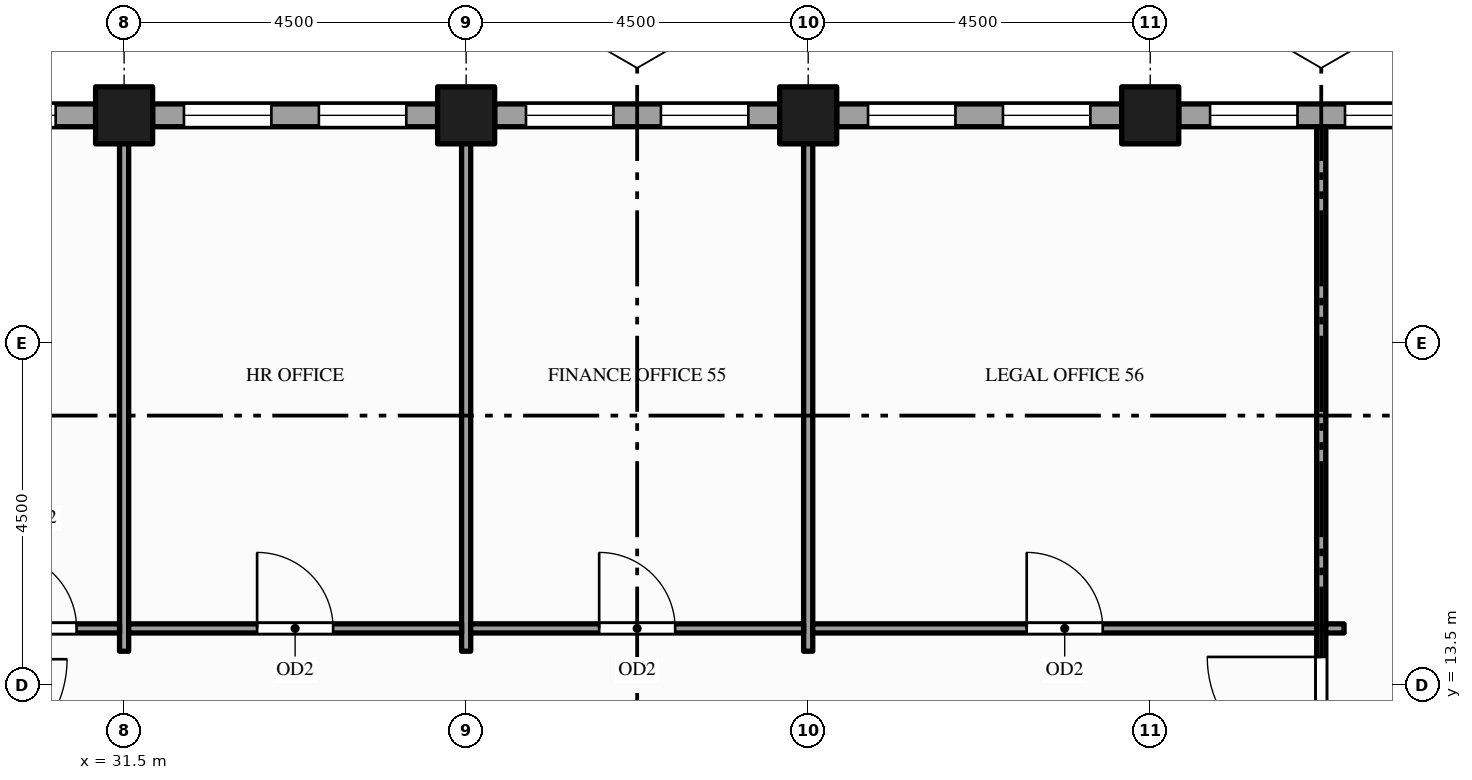
"""IFC4 building model, lengths in metres.
Left out: names, types, materials, properties, quantities, classifications, styles, units other than length and angle.
Written with IfcOpenShell. Run it as: python <this file> out.ifc"""

import sys

from ifc_helpers import new_model, si_unit, direction, frame, frame_2d, origin, origin_2d, place, context, subcontext, project, spatial, rectangle, hollow_rectangle, extrude, element, fill, save


model = new_model("IFC4")
c1 = context("Model", 3, precision=1e-05, world=origin(), true_north=direction((0.0, 1.0)))
c2 = subcontext(c1, "Body", "Model", "MODEL_VIEW")
j1 = project(units=[si_unit("LENGTHUNIT", "METRE"), si_unit("PLANEANGLEUNIT", "RADIAN")], contexts=[c1])
p1 = place(None, origin())
s1 = spatial("IfcSite", under=j1, at=p1, CompositionType="ELEMENT")
p2 = place(p1, origin())
s2 = spatial("IfcBuilding", under=s1, at=p2, CompositionType="ELEMENT")
p3 = place(p2, frame((0.0, 0.0, 207.0)))
s3 = spatial("IfcBuildingStorey", under=s2, at=p3, CompositionType="ELEMENT", Elevation=207.0)
for number, where, z_axis, x_axis in (
    (1, (31.5, 21.0, -0.15), (0.0, 0.0, 1.0), (1.0, 0.0, 0.0)),
    (2, (36.0, 21.0, -0.15), (0.0, 0.0, 1.0), (1.0, 0.0, 0.0)),
    (3, (40.5, 21.0, -0.15), (0.0, 0.0, 1.0), (1.0, 0.0, 0.0)),
    (4, (45.0, 21.0, -0.15), (0.0, 0.0, 1.0), (1.0, 0.0, 0.0)),
):
    element("IfcColumn", number, at=place(p3, frame(where, z_axis=z_axis, x_axis=x_axis)), inside=s3, PredefinedType="COLUMN", context=c2, shape_type="SweptSolid", body=[
        extrude(hollow_rectangle(XDim=0.75, YDim=0.75, WallThickness=0.036, at=origin_2d()), origin(), (0.0, 0.0, 1.0), 4.0),
    ])
p4 = place(p3, frame((49.125, 21.0, 0.0), z_axis=(0.0, 0.0, 1.0), x_axis=(-1.0, 0.0, 0.0)))
e5 = element("IfcWall", 5, at=p4, inside=s3, PredefinedType="STANDARD", context=c2, shape_type="SweptSolid", body=[
    extrude(rectangle(XDim=3.75, YDim=0.3, at=frame_2d((1.875, 0.0))), origin(), (0.0, 0.0, 1.0), 2.87),
])
p5 = place(p4, frame((0.413, 0.0, 0.9)))
e6 = element("IfcOpeningElement", 6, at=p5, cuts=e5, PredefinedType="OPENING", context=c2, shape_type="SweptSolid", body=[
    extrude(rectangle(XDim=1.15, YDim=1.75, at=frame_2d((0.575, 0.875))), frame((0.0, 0.16, 0.0), z_axis=(0.0, -1.0, 0.0), x_axis=(1.0, 0.0, 0.0)), (0.0, 0.0, 1.0), 0.32),
])
p6 = place(p4, frame((2.188, 0.0, 0.9)))
e7 = element("IfcOpeningElement", 7, at=p6, cuts=e5, PredefinedType="OPENING", context=c2, shape_type="SweptSolid", body=[
    extrude(rectangle(XDim=1.15, YDim=1.75, at=frame_2d((0.575, 0.875))), frame((0.0, 0.16, 0.0), z_axis=(0.0, -1.0, 0.0), x_axis=(1.0, 0.0, 0.0)), (0.0, 0.0, 1.0), 0.32),
])
p7 = place(p3, frame((44.625, 21.0, 0.0), z_axis=(0.0, 0.0, 1.0), x_axis=(-1.0, 0.0, 0.0)))
e8 = element("IfcWall", 8, at=p7, inside=s3, PredefinedType="STANDARD", context=c2, shape_type="SweptSolid", body=[
    extrude(rectangle(XDim=3.75, YDim=0.3, at=frame_2d((1.875, 0.0))), origin(), (0.0, 0.0, 1.0), 2.87),
])
p8 = place(p7, frame((0.413, 0.0, 0.9)))
e9 = element("IfcOpeningElement", 9, at=p8, cuts=e8, PredefinedType="OPENING", context=c2, shape_type="SweptSolid", body=[
    extrude(rectangle(XDim=1.15, YDim=1.75, at=frame_2d((0.575, 0.875))), frame((0.0, 0.16, 0.0), z_axis=(0.0, -1.0, 0.0), x_axis=(1.0, 0.0, 0.0)), (0.0, 0.0, 1.0), 0.32),
])
p9 = place(p7, frame((2.188, 0.0, 0.9)))
e10 = element("IfcOpeningElement", 10, at=p9, cuts=e8, PredefinedType="OPENING", context=c2, shape_type="SweptSolid", body=[
    extrude(rectangle(XDim=1.15, YDim=1.75, at=frame_2d((0.575, 0.875))), frame((0.0, 0.16, 0.0), z_axis=(0.0, -1.0, 0.0), x_axis=(1.0, 0.0, 0.0)), (0.0, 0.0, 1.0), 0.32),
])
p10 = place(p3, frame((40.125, 21.0, 0.0), z_axis=(0.0, 0.0, 1.0), x_axis=(-1.0, 0.0, 0.0)))
e11 = element("IfcWall", 11, at=p10, inside=s3, PredefinedType="STANDARD", context=c2, shape_type="SweptSolid", body=[
    extrude(rectangle(XDim=3.75, YDim=0.3, at=frame_2d((1.875, 0.0))), origin(), (0.0, 0.0, 1.0), 2.87),
])
p11 = place(p10, frame((0.413, 0.0, 0.9)))
e12 = element("IfcOpeningElement", 12, at=p11, cuts=e11, PredefinedType="OPENING", context=c2, shape_type="SweptSolid", body=[
    extrude(rectangle(XDim=1.15, YDim=1.75, at=frame_2d((0.575, 0.875))), frame((0.0, 0.16, 0.0), z_axis=(0.0, -1.0, 0.0), x_axis=(1.0, 0.0, 0.0)), (0.0, 0.0, 1.0), 0.32),
])
p12 = place(p10, frame((2.188, 0.0, 0.9)))
e13 = element("IfcOpeningElement", 13, at=p12, cuts=e11, PredefinedType="OPENING", context=c2, shape_type="SweptSolid", body=[
    extrude(rectangle(XDim=1.15, YDim=1.75, at=frame_2d((0.575, 0.875))), frame((0.0, 0.16, 0.0), z_axis=(0.0, -1.0, 0.0), x_axis=(1.0, 0.0, 0.0)), (0.0, 0.0, 1.0), 0.32),
])
p13 = place(p3, frame((35.625, 21.0, 0.0), z_axis=(0.0, 0.0, 1.0), x_axis=(-1.0, 0.0, 0.0)))
e14 = element("IfcWall", 14, at=p13, inside=s3, PredefinedType="STANDARD", context=c2, shape_type="SweptSolid", body=[
    extrude(rectangle(XDim=3.75, YDim=0.3, at=frame_2d((1.875, 0.0))), origin(), (0.0, 0.0, 1.0), 2.87),
])
p14 = place(p13, frame((0.413, 0.0, 0.9)))
e15 = element("IfcOpeningElement", 15, at=p14, cuts=e14, PredefinedType="OPENING", context=c2, shape_type="SweptSolid", body=[
    extrude(rectangle(XDim=1.15, YDim=1.75, at=frame_2d((0.575, 0.875))), frame((0.0, 0.16, 0.0), z_axis=(0.0, -1.0, 0.0), x_axis=(1.0, 0.0, 0.0)), (0.0, 0.0, 1.0), 0.32),
])
p15 = place(p13, frame((2.188, 0.0, 0.9)))
e16 = element("IfcOpeningElement", 16, at=p15, cuts=e14, PredefinedType="OPENING", context=c2, shape_type="SweptSolid", body=[
    extrude(rectangle(XDim=1.15, YDim=1.75, at=frame_2d((0.575, 0.875))), frame((0.0, 0.16, 0.0), z_axis=(0.0, -1.0, 0.0), x_axis=(1.0, 0.0, 0.0)), (0.0, 0.0, 1.0), 0.32),
])
p16 = place(p3, frame((31.125, 21.0, 0.0), z_axis=(0.0, 0.0, 1.0), x_axis=(-1.0, 0.0, 0.0)))
e17 = element("IfcWall", 17, at=p16, inside=s3, PredefinedType="STANDARD", context=c2, shape_type="SweptSolid", body=[
    extrude(rectangle(XDim=2.25, YDim=0.3, at=frame_2d((1.125, 0.0))), origin(), (0.0, 0.0, 1.0), 2.87),
])
p17 = place(p16, frame((0.525, 0.0, 0.9)))
e18 = element("IfcOpeningElement", 18, at=p17, cuts=e17, PredefinedType="OPENING", context=c2, shape_type="SweptSolid", body=[
    extrude(rectangle(XDim=1.2, YDim=1.75, at=frame_2d((0.6, 0.875))), frame((0.0, 0.16, 0.0), z_axis=(0.0, -1.0, 0.0), x_axis=(1.0, 0.0, 0.0)), (0.0, 0.0, 1.0), 0.32),
])
for number, where, z_axis, x_axis in (
    (19, (31.5, 13.95, 0.0), (0.0, 0.0, 1.0), (0.0, 1.0, 0.0)),
    (20, (36.0, 13.95, 0.0), (0.0, 0.0, 1.0), (0.0, 1.0, 0.0)),
    (21, (40.5, 13.95, 0.0), (0.0, 0.0, 1.0), (0.0, 1.0, 0.0)),
):
    element("IfcWall", number, at=place(p3, frame(where, z_axis=z_axis, x_axis=x_axis)), inside=s3, PredefinedType="PARTITIONING", context=c2, shape_type="SweptSolid", body=[
        extrude(rectangle(XDim=6.9, YDim=0.12, at=frame_2d((3.45, 0.0))), origin(), (0.0, 0.0, 1.0), 2.87),
    ])
p18 = place(p3, frame((47.25, -1.35, 0.0), z_axis=(0.0, 0.0, 1.0), x_axis=(0.0, 1.0, 0.0)))
e22 = element("IfcWall", 22, at=p18, inside=s3, PredefinedType="PARTITIONING", context=c2, shape_type="SweptSolid", body=[
    extrude(rectangle(XDim=22.2, YDim=0.12, at=frame_2d((11.1, 0.0))), origin(), (0.0, 0.0, 1.0), 2.87),
])
p19 = place(p18, frame((6.975, 0.0, 0.0)))
e23 = element("IfcOpeningElement", 23, at=p19, cuts=e22, PredefinedType="OPENING", context=c2, shape_type="SweptSolid", body=[
    extrude(rectangle(XDim=1.5, YDim=2.1, at=frame_2d((0.75, 1.05))), frame((0.0, 0.07, 0.0), z_axis=(0.0, -1.0, 0.0), x_axis=(1.0, 0.0, 0.0)), (0.0, 0.0, 1.0), 0.14),
])
p20 = place(p18, frame((13.725, 0.0, 0.0)))
e24 = element("IfcOpeningElement", 24, at=p20, cuts=e22, PredefinedType="OPENING", context=c2, shape_type="SweptSolid", body=[
    extrude(rectangle(XDim=1.5, YDim=2.1, at=frame_2d((0.75, 1.05))), frame((0.0, 0.07, 0.0), z_axis=(0.0, -1.0, 0.0), x_axis=(1.0, 0.0, 0.0)), (0.0, 0.0, 1.0), 0.14),
])
p21 = place(p18, frame((9.29, 0.0, 0.0)))
e25 = element("IfcOpeningElement", 25, at=p21, cuts=e22, PredefinedType="OPENING", context=c2, shape_type="SweptSolid", body=[
    extrude(rectangle(XDim=0.9, YDim=2.1, at=frame_2d((0.45, 1.05))), frame((0.0, 0.07, 0.0), z_axis=(0.0, -1.0, 0.0), x_axis=(1.0, 0.0, 0.0)), (0.0, 0.0, 1.0), 0.14),
])
p22 = place(p18, frame((10.65, 0.0, 0.0)))
e26 = element("IfcOpeningElement", 26, at=p22, cuts=e22, PredefinedType="OPENING", context=c2, shape_type="SweptSolid", body=[
    extrude(rectangle(XDim=0.9, YDim=2.1, at=frame_2d((0.45, 1.05))), frame((0.0, 0.07, 0.0), z_axis=(0.0, -1.0, 0.0), x_axis=(1.0, 0.0, 0.0)), (0.0, 0.0, 1.0), 0.14),
])
p23 = place(p18, frame((12.01, 0.0, 0.0)))
e27 = element("IfcOpeningElement", 27, at=p23, cuts=e22, PredefinedType="OPENING", context=c2, shape_type="SweptSolid", body=[
    extrude(rectangle(XDim=1.0, YDim=2.1, at=frame_2d((0.5, 1.05))), frame((0.0, 0.07, 0.0), z_axis=(0.0, -1.0, 0.0), x_axis=(1.0, 0.0, 0.0)), (0.0, 0.0, 1.0), 0.14),
])
p24 = place(p3, frame((29.31, 14.25, 0.0), z_axis=(0.0, 0.0, 1.0), x_axis=(1.0, 0.0, 0.0)))
e28 = element("IfcWall", 28, at=p24, inside=s3, PredefinedType="PARTITIONING", context=c2, shape_type="SweptSolid", body=[
    extrude(rectangle(XDim=2.13, YDim=0.12, at=frame_2d((1.065, 0.0))), origin(), (0.0, 0.0, 1.0), 2.87),
])
p25 = place(p24, frame((0.565, 0.0, 0.0)))
e29 = element("IfcOpeningElement", 29, at=p25, cuts=e28, PredefinedType="OPENING", context=c2, shape_type="SweptSolid", body=[
    extrude(rectangle(XDim=1.0, YDim=2.1, at=frame_2d((0.5, 1.05))), frame((0.0, 0.07, 0.0), z_axis=(0.0, -1.0, 0.0), x_axis=(1.0, 0.0, 0.0)), (0.0, 0.0, 1.0), 0.14),
])
p26 = place(p3, frame((31.56, 14.25, 0.0), z_axis=(0.0, 0.0, 1.0), x_axis=(1.0, 0.0, 0.0)))
e30 = element("IfcWall", 30, at=p26, inside=s3, PredefinedType="PARTITIONING", context=c2, shape_type="SweptSolid", body=[
    extrude(rectangle(XDim=4.38, YDim=0.12, at=frame_2d((2.19, 0.0))), origin(), (0.0, 0.0, 1.0), 2.87),
])
p27 = place(p26, frame((1.69, 0.0, 0.0)))
e31 = element("IfcOpeningElement", 31, at=p27, cuts=e30, PredefinedType="OPENING", context=c2, shape_type="SweptSolid", body=[
    extrude(rectangle(XDim=1.0, YDim=2.1, at=frame_2d((0.5, 1.05))), frame((0.0, 0.07, 0.0), z_axis=(0.0, -1.0, 0.0), x_axis=(1.0, 0.0, 0.0)), (0.0, 0.0, 1.0), 0.14),
])
p28 = place(p3, frame((36.06, 14.25, 0.0), z_axis=(0.0, 0.0, 1.0), x_axis=(1.0, 0.0, 0.0)))
e32 = element("IfcWall", 32, at=p28, inside=s3, PredefinedType="PARTITIONING", context=c2, shape_type="SweptSolid", body=[
    extrude(rectangle(XDim=4.38, YDim=0.12, at=frame_2d((2.19, 0.0))), origin(), (0.0, 0.0, 1.0), 2.87),
])
p29 = place(p28, frame((1.69, 0.0, 0.0)))
e33 = element("IfcOpeningElement", 33, at=p29, cuts=e32, PredefinedType="OPENING", context=c2, shape_type="SweptSolid", body=[
    extrude(rectangle(XDim=1.0, YDim=2.1, at=frame_2d((0.5, 1.05))), frame((0.0, 0.07, 0.0), z_axis=(0.0, -1.0, 0.0), x_axis=(1.0, 0.0, 0.0)), (0.0, 0.0, 1.0), 0.14),
])
p30 = place(p3, frame((40.56, 14.25, 0.0), z_axis=(0.0, 0.0, 1.0), x_axis=(1.0, 0.0, 0.0)))
e34 = element("IfcWall", 34, at=p30, inside=s3, PredefinedType="PARTITIONING", context=c2, shape_type="SweptSolid", body=[
    extrude(rectangle(XDim=6.63, YDim=0.12, at=frame_2d((3.315, 0.0))), origin(), (0.0, 0.0, 1.0), 2.87),
])
p31 = place(p30, frame((2.815, 0.0, 0.0)))
e35 = element("IfcOpeningElement", 35, at=p31, cuts=e34, PredefinedType="OPENING", context=c2, shape_type="SweptSolid", body=[
    extrude(rectangle(XDim=1.0, YDim=2.1, at=frame_2d((0.5, 1.05))), frame((0.0, 0.07, 0.0), z_axis=(0.0, -1.0, 0.0), x_axis=(1.0, 0.0, 0.0)), (0.0, 0.0, 1.0), 0.14),
])
p32 = place(p3, frame((47.31, 14.25, 0.0), z_axis=(0.0, 0.0, 1.0), x_axis=(1.0, 0.0, 0.0)))
e36 = element("IfcWall", 36, at=p32, inside=s3, PredefinedType="PARTITIONING", context=c2, shape_type="SweptSolid", body=[
    extrude(rectangle(XDim=0.24, YDim=0.12, at=frame_2d((0.12, 0.0))), origin(), (0.0, 0.0, 1.0), 2.87),
])
p33 = place(p5, origin())
e37 = element("IfcWindow", 37, at=p33, inside=s3, PartitioningType="SINGLE_PANEL", PredefinedType="WINDOW", context=c2, shape_type="SweptSolid", body=[
    extrude(rectangle(XDim=1.15, YDim=1.75, at=frame_2d((0.575, 0.875))), frame((0.0, 0.03, 0.0), z_axis=(0.0, -1.0, 0.0), x_axis=(1.0, 0.0, 0.0)), (0.0, 0.0, 1.0), 0.06),
])
fill(e6, e37)
p34 = place(p6, origin())
e38 = element("IfcWindow", 38, at=p34, inside=s3, PartitioningType="SINGLE_PANEL", PredefinedType="WINDOW", context=c2, shape_type="SweptSolid", body=[
    extrude(rectangle(XDim=1.15, YDim=1.75, at=frame_2d((0.575, 0.875))), frame((0.0, 0.03, 0.0), z_axis=(0.0, -1.0, 0.0), x_axis=(1.0, 0.0, 0.0)), (0.0, 0.0, 1.0), 0.06),
])
fill(e7, e38)
p35 = place(p8, origin())
e39 = element("IfcWindow", 39, at=p35, inside=s3, PartitioningType="SINGLE_PANEL", PredefinedType="WINDOW", context=c2, shape_type="SweptSolid", body=[
    extrude(rectangle(XDim=1.15, YDim=1.75, at=frame_2d((0.575, 0.875))), frame((0.0, 0.03, 0.0), z_axis=(0.0, -1.0, 0.0), x_axis=(1.0, 0.0, 0.0)), (0.0, 0.0, 1.0), 0.06),
])
fill(e9, e39)
p36 = place(p9, origin())
e40 = element("IfcWindow", 40, at=p36, inside=s3, PartitioningType="SINGLE_PANEL", PredefinedType="WINDOW", context=c2, shape_type="SweptSolid", body=[
    extrude(rectangle(XDim=1.15, YDim=1.75, at=frame_2d((0.575, 0.875))), frame((0.0, 0.03, 0.0), z_axis=(0.0, -1.0, 0.0), x_axis=(1.0, 0.0, 0.0)), (0.0, 0.0, 1.0), 0.06),
])
fill(e10, e40)
p37 = place(p11, origin())
e41 = element("IfcWindow", 41, at=p37, inside=s3, PartitioningType="SINGLE_PANEL", PredefinedType="WINDOW", context=c2, shape_type="SweptSolid", body=[
    extrude(rectangle(XDim=1.15, YDim=1.75, at=frame_2d((0.575, 0.875))), frame((0.0, 0.03, 0.0), z_axis=(0.0, -1.0, 0.0), x_axis=(1.0, 0.0, 0.0)), (0.0, 0.0, 1.0), 0.06),
])
fill(e12, e41)
p38 = place(p12, origin())
e42 = element("IfcWindow", 42, at=p38, inside=s3, PartitioningType="SINGLE_PANEL", PredefinedType="WINDOW", context=c2, shape_type="SweptSolid", body=[
    extrude(rectangle(XDim=1.15, YDim=1.75, at=frame_2d((0.575, 0.875))), frame((0.0, 0.03, 0.0), z_axis=(0.0, -1.0, 0.0), x_axis=(1.0, 0.0, 0.0)), (0.0, 0.0, 1.0), 0.06),
])
fill(e13, e42)
p39 = place(p14, origin())
e43 = element("IfcWindow", 43, at=p39, inside=s3, PartitioningType="SINGLE_PANEL", PredefinedType="WINDOW", context=c2, shape_type="SweptSolid", body=[
    extrude(rectangle(XDim=1.15, YDim=1.75, at=frame_2d((0.575, 0.875))), frame((0.0, 0.03, 0.0), z_axis=(0.0, -1.0, 0.0), x_axis=(1.0, 0.0, 0.0)), (0.0, 0.0, 1.0), 0.06),
])
fill(e15, e43)
p40 = place(p15, origin())
e44 = element("IfcWindow", 44, at=p40, inside=s3, PartitioningType="SINGLE_PANEL", PredefinedType="WINDOW", context=c2, shape_type="SweptSolid", body=[
    extrude(rectangle(XDim=1.15, YDim=1.75, at=frame_2d((0.575, 0.875))), frame((0.0, 0.03, 0.0), z_axis=(0.0, -1.0, 0.0), x_axis=(1.0, 0.0, 0.0)), (0.0, 0.0, 1.0), 0.06),
])
fill(e16, e44)
p41 = place(p17, origin())
e45 = element("IfcWindow", 45, at=p41, inside=s3, PartitioningType="SINGLE_PANEL", PredefinedType="WINDOW", context=c2, shape_type="SweptSolid", body=[
    extrude(rectangle(XDim=1.2, YDim=1.75, at=frame_2d((0.6, 0.875))), frame((0.0, 0.03, 0.0), z_axis=(0.0, -1.0, 0.0), x_axis=(1.0, 0.0, 0.0)), (0.0, 0.0, 1.0), 0.06),
])
fill(e18, e45)
p42 = place(p20, origin())
e46 = element("IfcDoor", 46, at=p42, inside=s3, OperationType="SINGLE_SWING_RIGHT", PredefinedType="DOOR", context=c2, shape_type="SweptSolid", body=[
    extrude(rectangle(XDim=1.5, YDim=2.1, at=frame_2d((0.75, 1.05))), frame((0.0, 0.025, 0.0), z_axis=(0.0, -1.0, 0.0), x_axis=(1.0, 0.0, 0.0)), (0.0, 0.0, 1.0), 0.05),
])
fill(e24, e46)
p43 = place(p25, origin())
e47 = element("IfcDoor", 47, at=p43, inside=s3, OperationType="SINGLE_SWING_LEFT", PredefinedType="DOOR", context=c2, shape_type="SweptSolid", body=[
    extrude(rectangle(XDim=1.0, YDim=2.1, at=frame_2d((0.5, 1.05))), frame((0.0, 0.025, 0.0), z_axis=(0.0, -1.0, 0.0), x_axis=(1.0, 0.0, 0.0)), (0.0, 0.0, 1.0), 0.05),
])
fill(e29, e47)
p44 = place(p27, origin())
e48 = element("IfcDoor", 48, at=p44, inside=s3, OperationType="SINGLE_SWING_LEFT", PredefinedType="DOOR", context=c2, shape_type="SweptSolid", body=[
    extrude(rectangle(XDim=1.0, YDim=2.1, at=frame_2d((0.5, 1.05))), frame((0.0, 0.025, 0.0), z_axis=(0.0, -1.0, 0.0), x_axis=(1.0, 0.0, 0.0)), (0.0, 0.0, 1.0), 0.05),
])
fill(e31, e48)
p45 = place(p29, origin())
e49 = element("IfcDoor", 49, at=p45, inside=s3, OperationType="SINGLE_SWING_LEFT", PredefinedType="DOOR", context=c2, shape_type="SweptSolid", body=[
    extrude(rectangle(XDim=1.0, YDim=2.1, at=frame_2d((0.5, 1.05))), frame((0.0, 0.025, 0.0), z_axis=(0.0, -1.0, 0.0), x_axis=(1.0, 0.0, 0.0)), (0.0, 0.0, 1.0), 0.05),
])
fill(e33, e49)
p46 = place(p31, origin())
e50 = element("IfcDoor", 50, at=p46, inside=s3, OperationType="SINGLE_SWING_LEFT", PredefinedType="DOOR", context=c2, shape_type="SweptSolid", body=[
    extrude(rectangle(XDim=1.0, YDim=2.1, at=frame_2d((0.5, 1.05))), frame((0.0, 0.025, 0.0), z_axis=(0.0, -1.0, 0.0), x_axis=(1.0, 0.0, 0.0)), (0.0, 0.0, 1.0), 0.05),
])
fill(e35, e50)
save(model, sys.argv[1])
